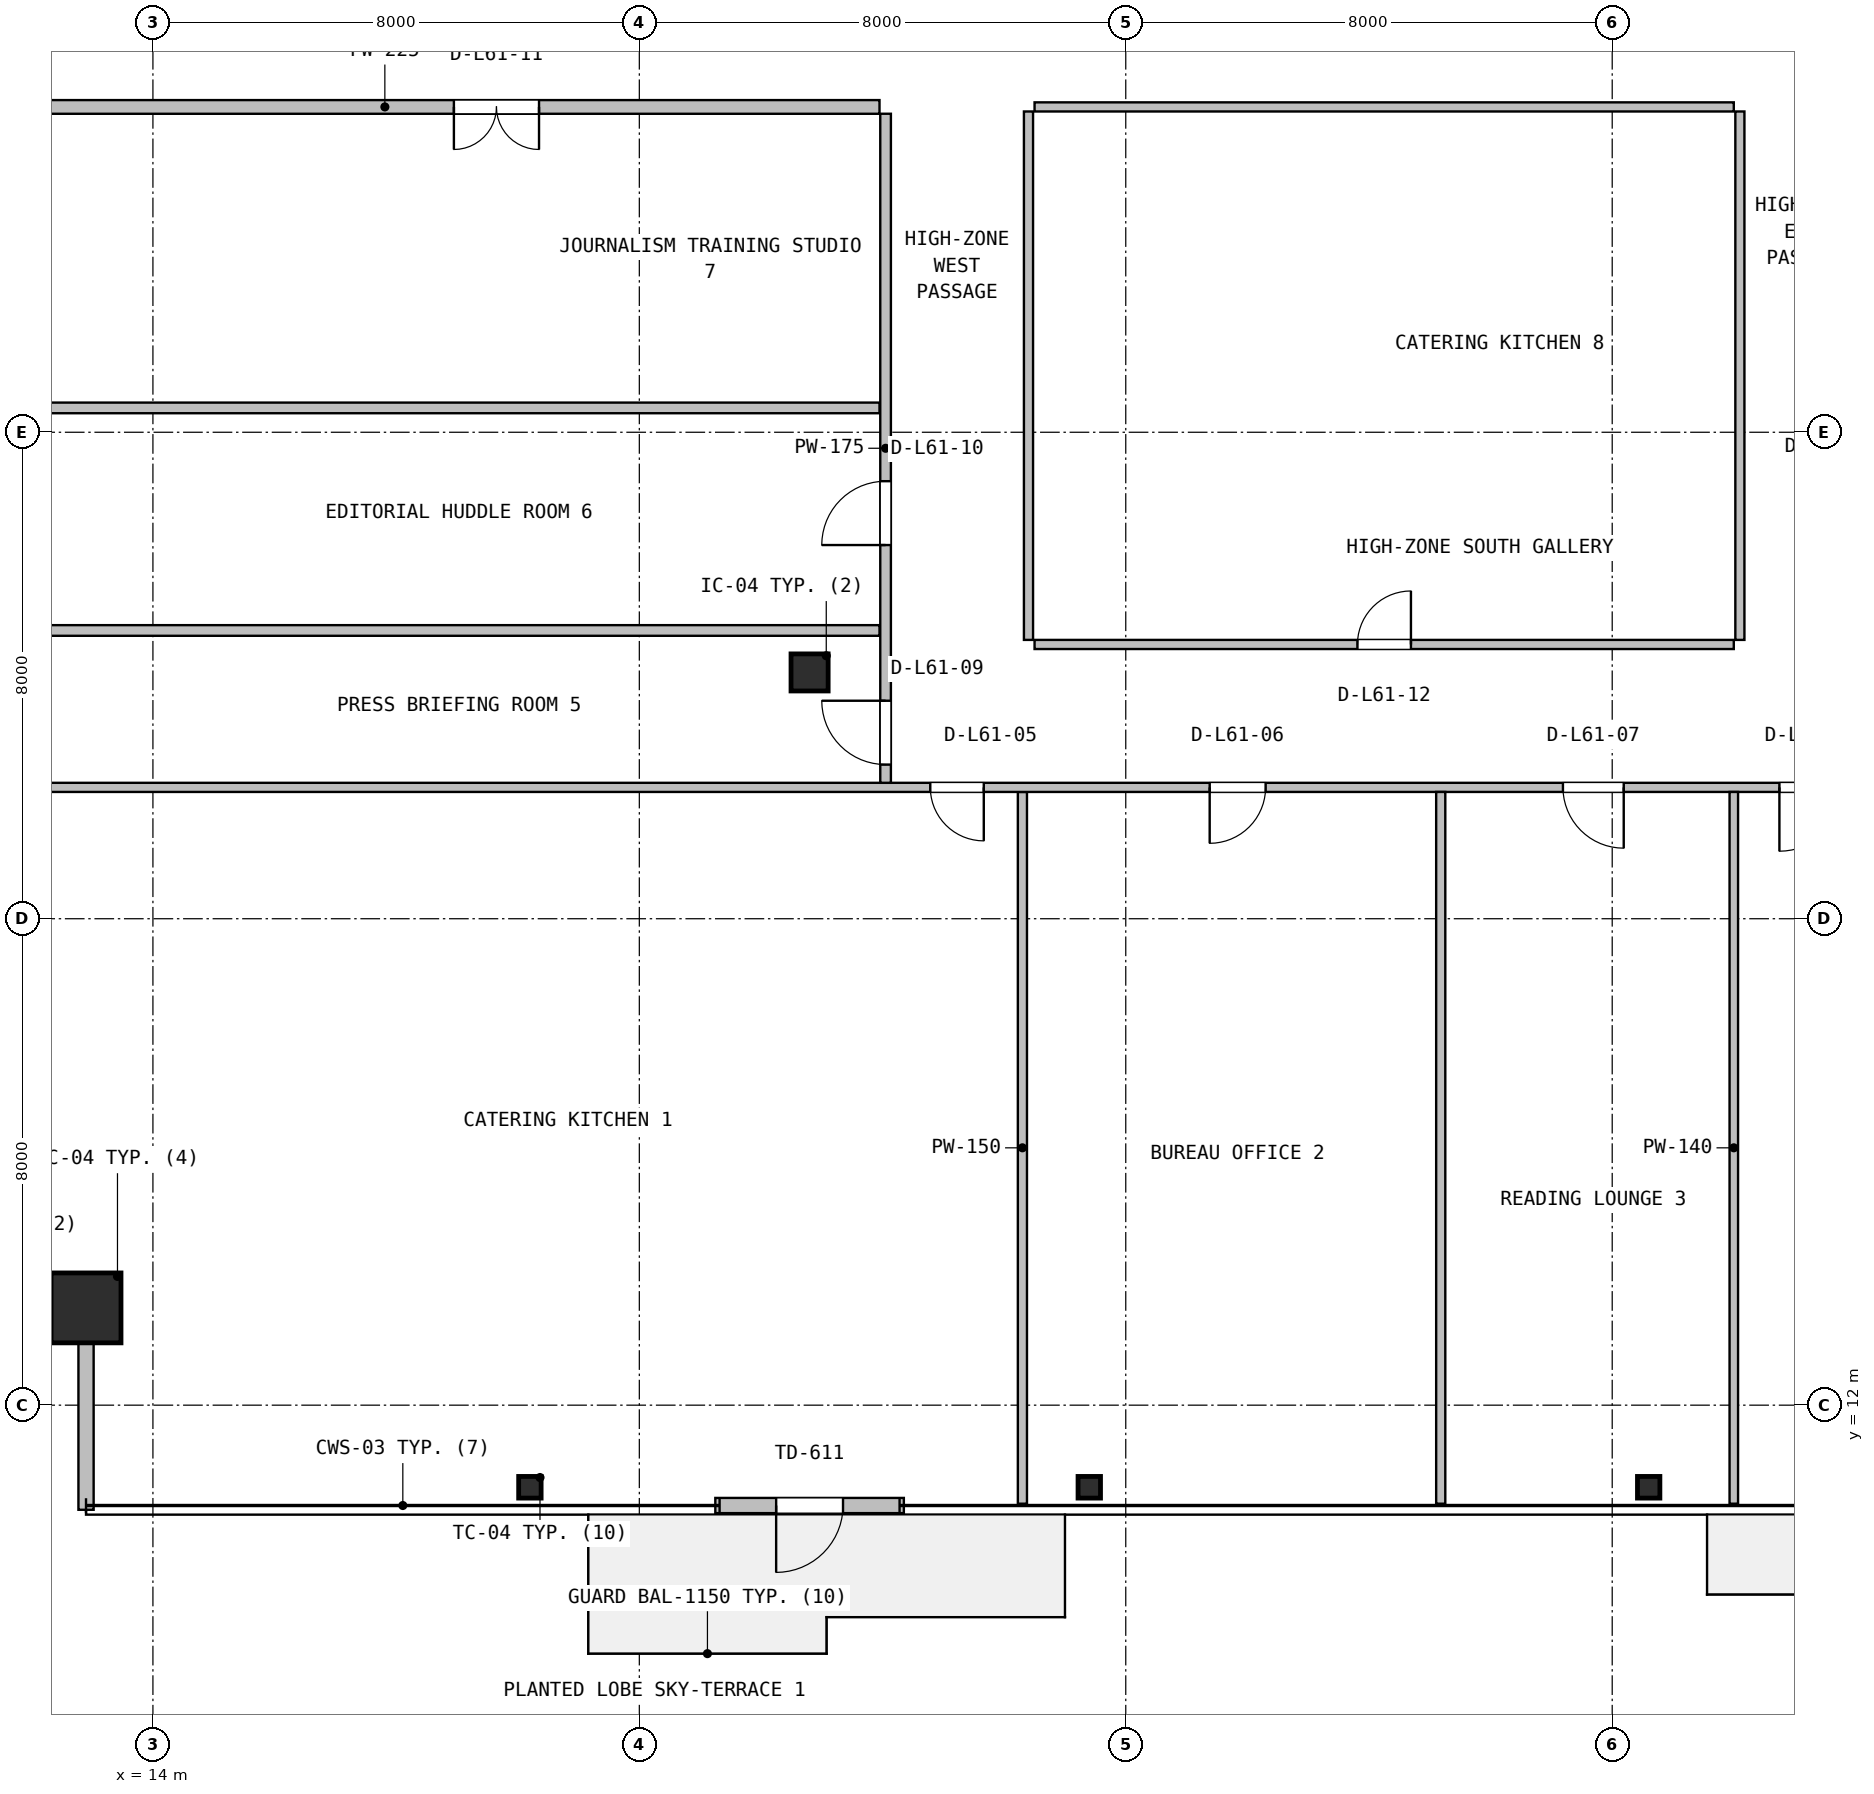
"""IFC4 building model, lengths in metres.
Left out: names, types, materials, properties, quantities, classifications, styles, units other than length and angle.
Written with IfcOpenShell. Run it as: python <this file> out.ifc"""

import sys

from ifc_helpers import new_model, si_unit, direction, frame, frame_2d, origin, origin_2d, place, context, subcontext, project, spatial, rectangle, hollow_rectangle, hollow_circle, i_section, extrude, source, transform, mapped, element, fill, save


model = new_model("IFC4")
c1 = context("Model", 3, precision=1e-05, world=origin(), true_north=direction((0.0, 1.0)))
c2 = subcontext(c1, "Body", "Model", "MODEL_VIEW")
j1 = project(units=[si_unit("LENGTHUNIT", "METRE"), si_unit("PLANEANGLEUNIT", "RADIAN")], contexts=[c1])
p1 = place(None, origin())
s1 = spatial("IfcSite", under=j1, at=p1, CompositionType="ELEMENT")
p2 = place(p1, origin())
s2 = spatial("IfcBuilding", under=s1, at=p2, CompositionType="ELEMENT")
p3 = place(p2, frame((0.0, 0.0, 247.0)))
s3 = spatial("IfcBuildingStorey", under=s2, at=p3, CompositionType="ELEMENT", Elevation=247.0)
m1 = source(origin(), c2, "Body", "SweptSolid", [
    extrude(hollow_rectangle(XDim=1.15, YDim=1.15, WallThickness=0.045, at=origin_2d()), origin(), (0.0, 0.0, 1.0), 3.8),
])
p4 = place(p3, frame((12.9, 13.6, 0.0), z_axis=(0.0, 0.0, 1.0), x_axis=(1.0, 0.0, 0.0)))
e1 = element("IfcColumn", 1, at=p4, inside=s3, PredefinedType="COLUMN", context=c2, shape_type="MappedRepresentation", body=[
    mapped(m1, transform((0.0, 0.0, 0.0), x_axis=(1.0, 0.0, 0.0), y_axis=(0.0, 1.0, 0.0), z_axis=(0.0, 0.0, 1.0), scale=1.0)),
])
m2 = source(origin(), c2, "Body", "SweptSolid", [
    extrude(i_section(OverallWidth=0.369, OverallDepth=0.356, WebThickness=0.011, FlangeThickness=0.018, FilletRadius=0.016, at=origin_2d()), origin(), (0.0, 0.0, 1.0), 3.8),
])
for number, where, z_axis, x_axis in (
    (2, (20.2, 10.65, 0.0), (0.0, 0.0, 1.0), (1.0, 0.0, 0.0)),
    (3, (29.4, 10.65, 0.0), (0.0, 0.0, 1.0), (1.0, 0.0, 0.0)),
    (4, (38.6, 10.65, 0.0), (0.0, 0.0, 1.0), (1.0, 0.0, 0.0)),
):
    element("IfcColumn", number, at=place(p3, frame(where, z_axis=z_axis, x_axis=x_axis)), inside=s3, PredefinedType="COLUMN", context=c2, shape_type="MappedRepresentation", body=[
        mapped(m2, transform((0.0, 0.0, 0.0), x_axis=(1.0, 0.0, 0.0), y_axis=(0.0, 1.0, 0.0), z_axis=(0.0, 0.0, 1.0), scale=1.0)),
    ])
m3 = source(origin(), c2, "Body", "SweptSolid", [
    extrude(hollow_circle(Radius=0.305, WallThickness=0.025, at=origin_2d()), origin(), (0.0, 0.0, 1.0), 3.8),
])
p5 = place(p3, frame((24.8, 24.05, 0.0), z_axis=(0.0, 0.0, 1.0), x_axis=(1.0, 0.0, 0.0)))
e5 = element("IfcColumn", 5, at=p5, inside=s3, PredefinedType="COLUMN", context=c2, shape_type="MappedRepresentation", body=[
    mapped(m3, transform((0.0, 0.0, 0.0), x_axis=(1.0, 0.0, 0.0), y_axis=(0.0, 1.0, 0.0), z_axis=(0.0, 0.0, 1.0), scale=1.0)),
])
p6 = place(p3, frame((23.25, 10.35, 0.0), z_axis=(0.0, 0.0, 1.0), x_axis=(1.0, 0.0, 0.0)))
e6 = element("IfcWall", 6, at=p6, inside=s3, PredefinedType="SOLIDWALL", context=c2, shape_type="SweptSolid", body=[
    extrude(rectangle(XDim=3.1, YDim=0.25, at=frame_2d((1.55, 0.0))), origin(), (0.0, 0.0, 1.0), 3.53),
])
p7 = place(p6, frame((1.0, 0.0, 0.0)))
e7 = element("IfcOpeningElement", 7, at=p7, cuts=e6, PredefinedType="OPENING", context=c2, shape_type="SweptSolid", body=[
    extrude(rectangle(XDim=1.1, YDim=2.15, at=frame_2d((0.55, 1.075))), frame((0.0, 0.135, 0.0), z_axis=(0.0, -1.0, 0.0), x_axis=(1.0, 0.0, 0.0)), (0.0, 0.0, 1.0), 0.27),
])
p8 = place(p3, frame((12.9, 10.28, 0.0), z_axis=(0.0, 0.0, 1.0), x_axis=(0.0, 1.0, 0.0)))
e8 = element("IfcWall", 8, at=p8, inside=s3, PredefinedType="SOLIDWALL", context=c2, shape_type="SweptSolid", body=[
    extrude(rectangle(XDim=3.4, YDim=0.25, at=frame_2d((1.7, 0.0))), origin(), (0.0, 0.0, 1.0), 3.171),
])
p9 = place(p3, frame((28.3, 10.38, 0.0), z_axis=(0.0, 0.0, 1.0), x_axis=(0.0, 1.0, 0.0)))
e9 = element("IfcWall", 9, at=p9, inside=s3, PredefinedType="PARTITIONING", context=c2, shape_type="SweptSolid", body=[
    extrude(rectangle(XDim=11.705, YDim=0.15, at=frame_2d((5.853, 0.0))), origin(), (0.0, 0.0, 1.0), 2.908),
])
p10 = place(p3, frame((9.68, 22.16, 0.0), z_axis=(0.0, 0.0, 1.0), x_axis=(1.0, 0.0, 0.0)))
e10 = element("IfcWall", 10, at=p10, inside=s3, PredefinedType="PARTITIONING", context=c2, shape_type="SweptSolid", body=[
    extrude(rectangle(XDim=48.64, YDim=0.15, at=frame_2d((24.32, 0.0))), origin(), (0.0, 0.0, 1.0), 2.908),
])
p11 = place(p10, frame((17.105, 0.0, 0.0)))
e11 = element("IfcOpeningElement", 11, at=p11, cuts=e10, PredefinedType="OPENING", context=c2, shape_type="SweptSolid", body=[
    extrude(rectangle(XDim=0.88, YDim=2.06, at=frame_2d((0.44, 1.03))), frame((0.0, 0.085, 0.0), z_axis=(0.0, -1.0, 0.0), x_axis=(1.0, 0.0, 0.0)), (0.0, 0.0, 1.0), 0.17),
])
p12 = place(p10, frame((21.7, 0.0, 0.0)))
e12 = element("IfcOpeningElement", 12, at=p12, cuts=e10, PredefinedType="OPENING", context=c2, shape_type="SweptSolid", body=[
    extrude(rectangle(XDim=0.92, YDim=2.08, at=frame_2d((0.46, 1.04))), frame((0.0, 0.085, 0.0), z_axis=(0.0, -1.0, 0.0), x_axis=(1.0, 0.0, 0.0)), (0.0, 0.0, 1.0), 0.17),
])
p13 = place(p10, frame((27.51, 0.0, 0.0)))
e13 = element("IfcOpeningElement", 13, at=p13, cuts=e10, PredefinedType="OPENING", context=c2, shape_type="SweptSolid", body=[
    extrude(rectangle(XDim=1.0, YDim=2.1, at=frame_2d((0.5, 1.05))), frame((0.0, 0.085, 0.0), z_axis=(0.0, -1.0, 0.0), x_axis=(1.0, 0.0, 0.0)), (0.0, 0.0, 1.0), 0.17),
])
p14 = place(p10, frame((31.07, 0.0, 0.0)))
e14 = element("IfcOpeningElement", 14, at=p14, cuts=e10, PredefinedType="OPENING", context=c2, shape_type="SweptSolid", body=[
    extrude(rectangle(XDim=1.05, YDim=2.1, at=frame_2d((0.525, 1.05))), frame((0.0, 0.085, 0.0), z_axis=(0.0, -1.0, 0.0), x_axis=(1.0, 0.0, 0.0)), (0.0, 0.0, 1.0), 0.17),
])
p15 = place(p3, frame((35.18, 10.38, 0.0), z_axis=(0.0, 0.0, 1.0), x_axis=(0.0, 1.0, 0.0)))
e15 = element("IfcWall", 15, at=p15, inside=s3, PredefinedType="PARTITIONING", context=c2, shape_type="SweptSolid", body=[
    extrude(rectangle(XDim=11.705, YDim=0.15, at=frame_2d((5.853, 0.0))), origin(), (0.0, 0.0, 1.0), 3.171),
])
p16 = place(p3, frame((40.0, 10.38, 0.0), z_axis=(0.0, 0.0, 1.0), x_axis=(0.0, 1.0, 0.0)))
e16 = element("IfcWall", 16, at=p16, inside=s3, PredefinedType="PARTITIONING", context=c2, shape_type="SweptSolid", body=[
    extrude(rectangle(XDim=11.705, YDim=0.14, at=frame_2d((5.853, 0.0))), origin(), (0.0, 0.0, 1.0), 3.171),
])
p17 = place(p3, frame((26.05, 22.235, 0.0), z_axis=(0.0, 0.0, 1.0), x_axis=(0.0, 1.0, 0.0)))
e17 = element("IfcWall", 17, at=p17, inside=s3, PredefinedType="PARTITIONING", context=c2, shape_type="SweptSolid", body=[
    extrude(rectangle(XDim=11.003, YDim=0.175, at=frame_2d((5.501, 0.0))), origin(), (0.0, 0.0, 1.0), 2.908),
])
p18 = place(p17, frame((0.3, 0.0, 0.0)))
e18 = element("IfcOpeningElement", 18, at=p18, cuts=e17, PredefinedType="OPENING", context=c2, shape_type="SweptSolid", body=[
    extrude(rectangle(XDim=1.05, YDim=2.1, at=frame_2d((0.525, 1.05))), frame((0.0, 0.098, 0.0), z_axis=(0.0, -1.0, 0.0), x_axis=(1.0, 0.0, 0.0)), (0.0, 0.0, 1.0), 0.195),
])
p19 = place(p17, frame((3.91, 0.0, 0.0)))
e19 = element("IfcOpeningElement", 19, at=p19, cuts=e17, PredefinedType="OPENING", context=c2, shape_type="SweptSolid", body=[
    extrude(rectangle(XDim=1.05, YDim=2.1, at=frame_2d((0.525, 1.05))), frame((0.0, 0.098, 0.0), z_axis=(0.0, -1.0, 0.0), x_axis=(1.0, 0.0, 0.0)), (0.0, 0.0, 1.0), 0.195),
])
for number, where, z_axis, x_axis in (
    (20, (9.68, 24.74, 0.0), (0.0, 0.0, 1.0), (1.0, 0.0, 0.0)),
    (21, (9.68, 28.4, 0.0), (0.0, 0.0, 1.0), (1.0, 0.0, 0.0)),
):
    element("IfcWall", number, at=place(p3, frame(where, z_axis=z_axis, x_axis=x_axis)), inside=s3, PredefinedType="PARTITIONING", context=c2, shape_type="SweptSolid", body=[
        extrude(rectangle(XDim=16.27, YDim=0.175, at=frame_2d((8.135, 0.0))), origin(), (0.0, 0.0, 1.0), 2.908),
    ])
p20 = place(p3, frame((9.68, 33.35, 0.0), z_axis=(0.0, 0.0, 1.0), x_axis=(1.0, 0.0, 0.0)))
e22 = element("IfcWall", 22, at=p20, inside=s3, PredefinedType="PARTITIONING", context=c2, shape_type="SweptSolid", body=[
    extrude(rectangle(XDim=16.27, YDim=0.225, at=frame_2d((8.135, 0.0))), origin(), (0.0, 0.0, 1.0), 2.908),
])
p21 = place(p20, frame((9.27, 0.0, 0.0)))
e23 = element("IfcOpeningElement", 23, at=p21, cuts=e22, PredefinedType="OPENING", context=c2, shape_type="SweptSolid", body=[
    extrude(rectangle(XDim=1.4, YDim=2.12, at=frame_2d((0.7, 1.06))), frame((0.0, 0.123, 0.0), z_axis=(0.0, -1.0, 0.0), x_axis=(1.0, 0.0, 0.0)), (0.0, 0.0, 1.0), 0.245),
])
p22 = place(p3, frame((28.5, 24.51, 0.0), z_axis=(0.0, 0.0, 1.0), x_axis=(1.0, 0.0, 0.0)))
e24 = element("IfcWall", 24, at=p22, inside=s3, PredefinedType="PARTITIONING", context=c2, shape_type="SweptSolid", body=[
    extrude(rectangle(XDim=11.5, YDim=0.15, at=frame_2d((5.75, 0.0))), origin(), (0.0, 0.0, 1.0), 2.908),
])
p23 = place(p22, frame((5.31, 0.0, 0.0)))
e25 = element("IfcOpeningElement", 25, at=p23, cuts=e24, PredefinedType="OPENING", context=c2, shape_type="SweptSolid", body=[
    extrude(rectangle(XDim=0.88, YDim=2.06, at=frame_2d((0.44, 1.03))), frame((0.0, 0.085, 0.0), z_axis=(0.0, -1.0, 0.0), x_axis=(1.0, 0.0, 0.0)), (0.0, 0.0, 1.0), 0.17),
])
p24 = place(p3, frame((40.1, 24.585, 0.0), z_axis=(0.0, 0.0, 1.0), x_axis=(0.0, 1.0, 0.0)))
e26 = element("IfcWall", 26, at=p24, inside=s3, PredefinedType="PARTITIONING", context=c2, shape_type="SweptSolid", body=[
    extrude(rectangle(XDim=8.69, YDim=0.15, at=frame_2d((4.345, 0.0))), origin(), (0.0, 0.0, 1.0), 3.222),
])
p25 = place(p3, frame((28.5, 33.35, 0.0), z_axis=(0.0, 0.0, 1.0), x_axis=(1.0, 0.0, 0.0)))
e27 = element("IfcWall", 27, at=p25, inside=s3, PredefinedType="PARTITIONING", context=c2, shape_type="SweptSolid", body=[
    extrude(rectangle(XDim=11.5, YDim=0.15, at=frame_2d((5.75, 0.0))), origin(), (0.0, 0.0, 1.0), 2.908),
])
p26 = place(p3, frame((28.4, 24.585, 0.0), z_axis=(0.0, 0.0, 1.0), x_axis=(0.0, 1.0, 0.0)))
e28 = element("IfcWall", 28, at=p26, inside=s3, PredefinedType="PARTITIONING", context=c2, shape_type="SweptSolid", body=[
    extrude(rectangle(XDim=8.69, YDim=0.15, at=frame_2d((4.345, 0.0))), origin(), (0.0, 0.0, 1.0), 3.222),
])
m4 = source(origin(), c2, "Body", "SweptSolid", [
    extrude(rectangle(XDim=1.1, YDim=2.15, at=frame_2d((0.55, 1.075))), frame((0.0, 0.025, 0.0), z_axis=(0.0, -1.0, 0.0), x_axis=(1.0, 0.0, 0.0)), (0.0, 0.0, 1.0), 0.05),
])
p27 = place(p7, frame((1.1, 0.0, 0.0), z_axis=(0.0, 0.0, 1.0), x_axis=(-1.0, 0.0, 0.0)))
e29 = element("IfcDoor", 29, at=p27, inside=s3, OperationType="SINGLE_SWING_LEFT", PredefinedType="DOOR", context=c2, shape_type="MappedRepresentation", body=[
    mapped(m4, transform((0.0, 0.0, 0.0), x_axis=(1.0, 0.0, 0.0), y_axis=(0.0, 1.0, 0.0), z_axis=(0.0, 0.0, 1.0), scale=1.0)),
])
fill(e7, e29)
m5 = source(origin(), c2, "Body", "SweptSolid", [
    extrude(rectangle(XDim=0.88, YDim=2.06, at=frame_2d((0.44, 1.03))), frame((0.0, 0.025, 0.0), z_axis=(0.0, -1.0, 0.0), x_axis=(1.0, 0.0, 0.0)), (0.0, 0.0, 1.0), 0.05),
])
p28 = place(p11, frame((0.88, 0.0, 0.0), z_axis=(0.0, 0.0, 1.0), x_axis=(-1.0, 0.0, 0.0)))
e30 = element("IfcDoor", 30, at=p28, inside=s3, OperationType="SINGLE_SWING_RIGHT", PredefinedType="DOOR", context=c2, shape_type="MappedRepresentation", body=[
    mapped(m5, transform((0.0, 0.0, 0.0), x_axis=(1.0, 0.0, 0.0), y_axis=(0.0, 1.0, 0.0), z_axis=(0.0, 0.0, 1.0), scale=1.0)),
])
fill(e11, e30)
m6 = source(origin(), c2, "Body", "SweptSolid", [
    extrude(rectangle(XDim=0.92, YDim=2.08, at=frame_2d((0.46, 1.04))), frame((0.0, 0.025, 0.0), z_axis=(0.0, -1.0, 0.0), x_axis=(1.0, 0.0, 0.0)), (0.0, 0.0, 1.0), 0.05),
])
p29 = place(p12, frame((0.92, 0.0, 0.0), z_axis=(0.0, 0.0, 1.0), x_axis=(-1.0, 0.0, 0.0)))
e31 = element("IfcDoor", 31, at=p29, inside=s3, OperationType="SINGLE_SWING_LEFT", PredefinedType="DOOR", context=c2, shape_type="MappedRepresentation", body=[
    mapped(m6, transform((0.0, 0.0, 0.0), x_axis=(1.0, 0.0, 0.0), y_axis=(0.0, 1.0, 0.0), z_axis=(0.0, 0.0, 1.0), scale=1.0)),
])
fill(e12, e31)
m7 = source(origin(), c2, "Body", "SweptSolid", [
    extrude(rectangle(XDim=1.0, YDim=2.1, at=frame_2d((0.5, 1.05))), frame((0.0, 0.025, 0.0), z_axis=(0.0, -1.0, 0.0), x_axis=(1.0, 0.0, 0.0)), (0.0, 0.0, 1.0), 0.05),
])
p30 = place(p13, frame((1.0, 0.0, 0.0), z_axis=(0.0, 0.0, 1.0), x_axis=(-1.0, 0.0, 0.0)))
e32 = element("IfcDoor", 32, at=p30, inside=s3, OperationType="SINGLE_SWING_RIGHT", PredefinedType="DOOR", context=c2, shape_type="MappedRepresentation", body=[
    mapped(m7, transform((0.0, 0.0, 0.0), x_axis=(1.0, 0.0, 0.0), y_axis=(0.0, 1.0, 0.0), z_axis=(0.0, 0.0, 1.0), scale=1.0)),
])
fill(e13, e32)
m8 = source(origin(), c2, "Body", "SweptSolid", [
    extrude(rectangle(XDim=1.05, YDim=2.1, at=frame_2d((0.525, 1.05))), frame((0.0, 0.025, 0.0), z_axis=(0.0, -1.0, 0.0), x_axis=(1.0, 0.0, 0.0)), (0.0, 0.0, 1.0), 0.05),
])
p31 = place(p14, frame((1.05, 0.0, 0.0), z_axis=(0.0, 0.0, 1.0), x_axis=(-1.0, 0.0, 0.0)))
e33 = element("IfcDoor", 33, at=p31, inside=s3, OperationType="SINGLE_SWING_LEFT", PredefinedType="DOOR", context=c2, shape_type="MappedRepresentation", body=[
    mapped(m8, transform((0.0, 0.0, 0.0), x_axis=(1.0, 0.0, 0.0), y_axis=(0.0, 1.0, 0.0), z_axis=(0.0, 0.0, 1.0), scale=1.0)),
])
fill(e14, e33)
p32 = place(p18, origin())
e34 = element("IfcDoor", 34, at=p32, inside=s3, OperationType="SINGLE_SWING_RIGHT", PredefinedType="DOOR", context=c2, shape_type="MappedRepresentation", body=[
    mapped(m8, transform((0.0, 0.0, 0.0), x_axis=(1.0, 0.0, 0.0), y_axis=(0.0, 1.0, 0.0), z_axis=(0.0, 0.0, 1.0), scale=1.0)),
])
fill(e18, e34)
p33 = place(p19, origin())
e35 = element("IfcDoor", 35, at=p33, inside=s3, OperationType="SINGLE_SWING_LEFT", PredefinedType="DOOR", context=c2, shape_type="MappedRepresentation", body=[
    mapped(m8, transform((0.0, 0.0, 0.0), x_axis=(1.0, 0.0, 0.0), y_axis=(0.0, 1.0, 0.0), z_axis=(0.0, 0.0, 1.0), scale=1.0)),
])
fill(e19, e35)
m9 = source(origin(), c2, "Body", "SweptSolid", [
    extrude(rectangle(XDim=1.4, YDim=2.12, at=frame_2d((0.7, 1.06))), frame((0.0, 0.025, 0.0), z_axis=(0.0, -1.0, 0.0), x_axis=(1.0, 0.0, 0.0)), (0.0, 0.0, 1.0), 0.05),
])
p34 = place(p21, frame((1.4, 0.0, 0.0), z_axis=(0.0, 0.0, 1.0), x_axis=(-1.0, 0.0, 0.0)))
e36 = element("IfcDoor", 36, at=p34, inside=s3, OperationType="DOUBLE_DOOR_SINGLE_SWING", PredefinedType="DOOR", context=c2, shape_type="MappedRepresentation", body=[
    mapped(m9, transform((0.0, 0.0, 0.0), x_axis=(1.0, 0.0, 0.0), y_axis=(0.0, 1.0, 0.0), z_axis=(0.0, 0.0, 1.0), scale=1.0)),
])
fill(e23, e36)
p35 = place(p23, origin())
e37 = element("IfcDoor", 37, at=p35, inside=s3, OperationType="SINGLE_SWING_RIGHT", PredefinedType="DOOR", context=c2, shape_type="MappedRepresentation", body=[
    mapped(m5, transform((0.0, 0.0, 0.0), x_axis=(1.0, 0.0, 0.0), y_axis=(0.0, 1.0, 0.0), z_axis=(0.0, 0.0, 1.0), scale=1.0)),
])
fill(e25, e37)
save(model, sys.argv[1])
